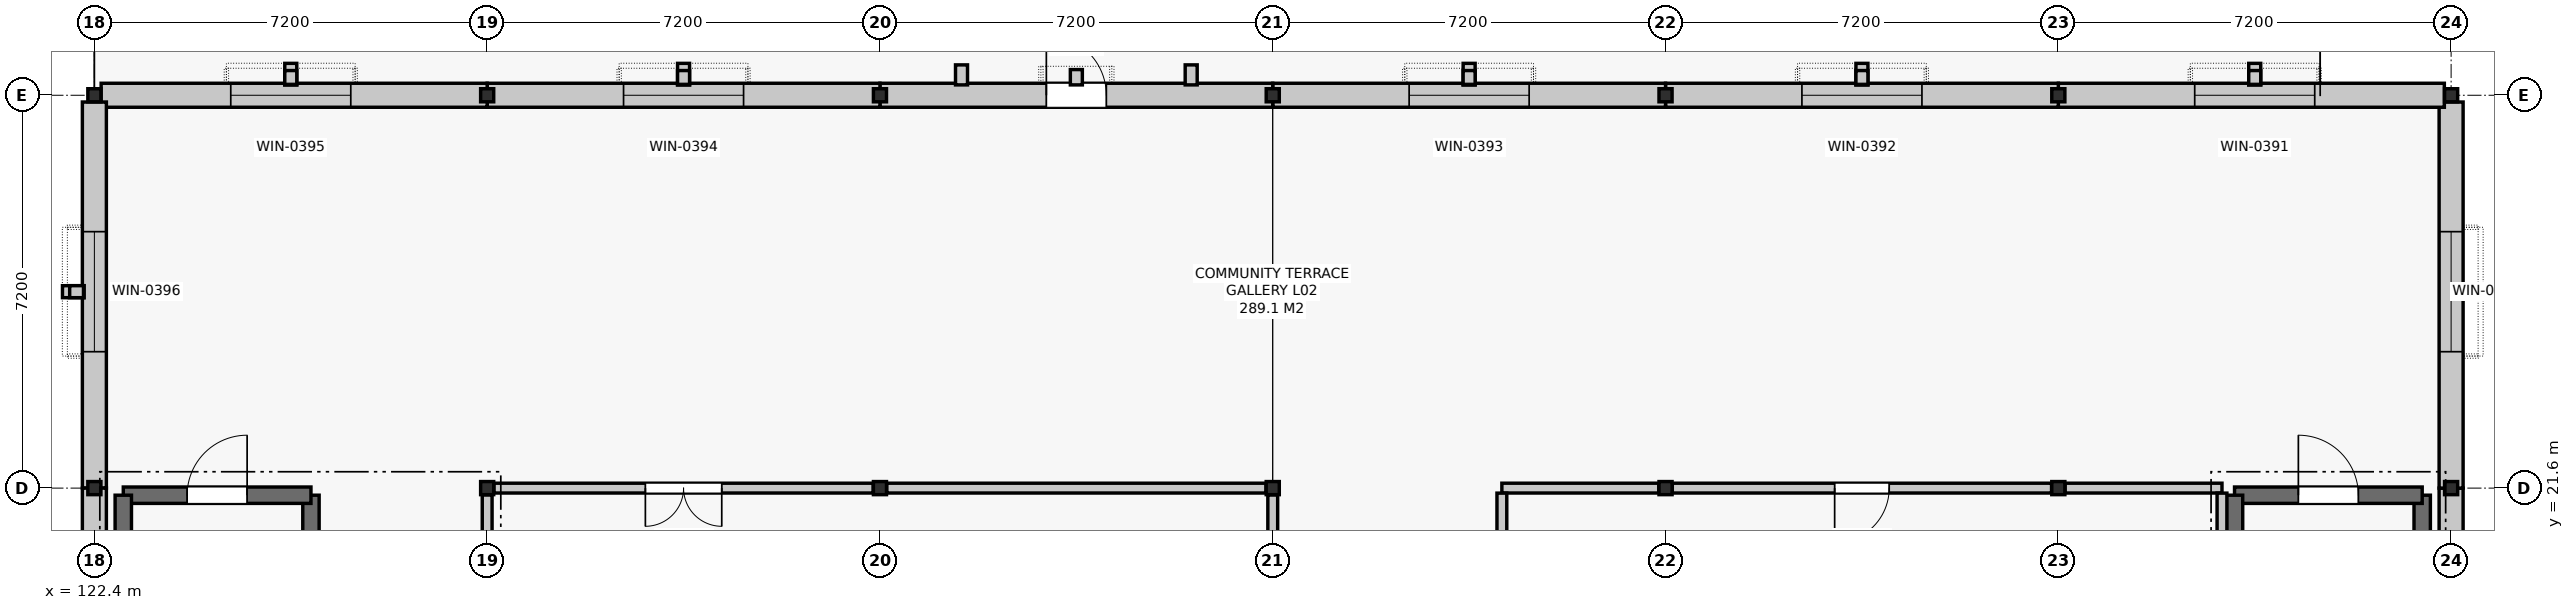
"""IFC4 building model, lengths in metres.
Left out: names, types, materials, properties, quantities, classifications, styles, units other than length and angle.
Written with IfcOpenShell. Run it as: python <this file> out.ifc"""

import sys

from ifc_helpers import new_model, si_unit, direction, frame, frame_2d, origin, origin_2d, place, context, subcontext, project, spatial, rectangle, i_section, extrude, element, fill, save


model = new_model("IFC4")
c1 = context("Model", 3, precision=1e-05, world=origin(), true_north=direction((0.0, 1.0)))
c2 = subcontext(c1, "Body", "Model", "MODEL_VIEW")
j1 = project(units=[si_unit("LENGTHUNIT", "METRE"), si_unit("PLANEANGLEUNIT", "RADIAN")], contexts=[c1])
p1 = place(None, origin())
s1 = spatial("IfcSite", under=j1, at=p1, CompositionType="ELEMENT")
p2 = place(p1, origin())
s2 = spatial("IfcBuilding", under=s1, at=p2, CompositionType="ELEMENT")
p3 = place(p2, frame((0.0, 0.0, 10.2)))
s3 = spatial("IfcBuildingStorey", under=s2, at=p3, CompositionType="ELEMENT", Elevation=10.2)
for number, where, z_axis, x_axis in (
    (1, (122.4, 21.6, 0.0), (0.0, 0.0, 1.0), (1.0, 0.0, 0.0)),
    (2, (122.4, 28.8, 0.0), (0.0, 0.0, 1.0), (1.0, 0.0, 0.0)),
    (3, (129.6, 21.6, 0.0), (0.0, 0.0, 1.0), (1.0, 0.0, 0.0)),
    (4, (129.6, 28.8, 0.0), (0.0, 0.0, 1.0), (1.0, 0.0, 0.0)),
    (5, (136.8, 21.6, 0.0), (0.0, 0.0, 1.0), (1.0, 0.0, 0.0)),
    (6, (136.8, 28.8, 0.0), (0.0, 0.0, 1.0), (1.0, 0.0, 0.0)),
    (7, (144.0, 21.6, 0.0), (0.0, 0.0, 1.0), (1.0, 0.0, 0.0)),
    (8, (144.0, 28.8, 0.0), (0.0, 0.0, 1.0), (1.0, 0.0, 0.0)),
    (9, (151.2, 21.6, 0.0), (0.0, 0.0, 1.0), (1.0, 0.0, 0.0)),
    (10, (151.2, 28.8, 0.0), (0.0, 0.0, 1.0), (1.0, 0.0, 0.0)),
    (11, (158.4, 21.6, 0.0), (0.0, 0.0, 1.0), (1.0, 0.0, 0.0)),
    (12, (158.4, 28.8, 0.0), (0.0, 0.0, 1.0), (1.0, 0.0, 0.0)),
    (13, (165.6, 21.6, 0.0), (0.0, 0.0, 1.0), (1.0, 0.0, 0.0)),
    (14, (165.6, 28.8, 0.0), (0.0, 0.0, 1.0), (1.0, 0.0, 0.0)),
):
    element("IfcColumn", number, at=place(p3, frame(where, z_axis=z_axis, x_axis=x_axis)), inside=s3, PredefinedType="COLUMN", context=c2, shape_type="SweptSolid", body=[
        extrude(i_section(OverallWidth=0.24, OverallDepth=0.24, WebThickness=0.01, FlangeThickness=0.017, FilletRadius=0.021, at=origin_2d()), origin(), (0.0, 0.0, 1.0), 4.2),
    ])
p4 = place(p3, frame((165.6, 14.4, 0.0), z_axis=(0.0, 0.0, 1.0), x_axis=(0.0, 1.0, 0.0)))
e15 = element("IfcWall", 15, at=p4, inside=s3, PredefinedType="SOLIDWALL", context=c2, shape_type="SweptSolid", body=[
    extrude(rectangle(XDim=7.2, YDim=0.44, at=frame_2d((3.6, 0.0))), origin(), (0.0, 0.0, 1.0), 3.2),
])
p5 = place(p3, frame((165.6, 21.6, 0.0), z_axis=(0.0, 0.0, 1.0), x_axis=(0.0, 1.0, 0.0)))
e16 = element("IfcWall", 16, at=p5, inside=s3, PredefinedType="SOLIDWALL", context=c2, shape_type="SweptSolid", body=[
    extrude(rectangle(XDim=7.076, YDim=0.44, at=frame_2d((3.538, 0.0))), origin(), (0.0, 0.0, 1.0), 3.2),
])
p6 = place(p5, frame((2.5, 0.0, 0.87)))
e17 = element("IfcOpeningElement", 17, at=p6, cuts=e16, PredefinedType="OPENING", context=c2, shape_type="SweptSolid", body=[
    extrude(rectangle(XDim=2.2, YDim=2.25, at=frame_2d((1.1, 1.125))), frame((0.0, 0.232, 0.0), z_axis=(0.0, -1.0, 0.0), x_axis=(1.0, 0.0, 0.0)), (0.0, 0.0, 1.0), 0.464),
])
p7 = place(p3, frame((165.476, 28.8, 0.0), z_axis=(0.0, 0.0, 1.0), x_axis=(-1.0, 0.0, 0.0)))
e18 = element("IfcWall", 18, at=p7, inside=s3, PredefinedType="SOLIDWALL", context=c2, shape_type="SweptSolid", body=[
    extrude(rectangle(XDim=7.076, YDim=0.44, at=frame_2d((3.538, 0.0))), origin(), (0.0, 0.0, 1.0), 3.2),
])
p8 = place(p7, frame((2.376, 0.0, 0.87)))
e19 = element("IfcOpeningElement", 19, at=p8, cuts=e18, PredefinedType="OPENING", context=c2, shape_type="SweptSolid", body=[
    extrude(rectangle(XDim=2.2, YDim=2.25, at=frame_2d((1.1, 1.125))), frame((0.0, 0.232, 0.0), z_axis=(0.0, -1.0, 0.0), x_axis=(1.0, 0.0, 0.0)), (0.0, 0.0, 1.0), 0.464),
])
p9 = place(p3, frame((158.4, 28.8, 0.0), z_axis=(0.0, 0.0, 1.0), x_axis=(-1.0, 0.0, 0.0)))
e20 = element("IfcWall", 20, at=p9, inside=s3, PredefinedType="SOLIDWALL", context=c2, shape_type="SweptSolid", body=[
    extrude(rectangle(XDim=7.2, YDim=0.44, at=frame_2d((3.6, 0.0))), origin(), (0.0, 0.0, 1.0), 3.2),
])
p10 = place(p9, frame((2.5, 0.0, 0.87)))
e21 = element("IfcOpeningElement", 21, at=p10, cuts=e20, PredefinedType="OPENING", context=c2, shape_type="SweptSolid", body=[
    extrude(rectangle(XDim=2.2, YDim=2.25, at=frame_2d((1.1, 1.125))), frame((0.0, 0.232, 0.0), z_axis=(0.0, -1.0, 0.0), x_axis=(1.0, 0.0, 0.0)), (0.0, 0.0, 1.0), 0.464),
])
p11 = place(p3, frame((151.2, 28.8, 0.0), z_axis=(0.0, 0.0, 1.0), x_axis=(-1.0, 0.0, 0.0)))
e22 = element("IfcWall", 22, at=p11, inside=s3, PredefinedType="SOLIDWALL", context=c2, shape_type="SweptSolid", body=[
    extrude(rectangle(XDim=7.2, YDim=0.44, at=frame_2d((3.6, 0.0))), origin(), (0.0, 0.0, 1.0), 3.2),
])
p12 = place(p11, frame((2.5, 0.0, 0.87)))
e23 = element("IfcOpeningElement", 23, at=p12, cuts=e22, PredefinedType="OPENING", context=c2, shape_type="SweptSolid", body=[
    extrude(rectangle(XDim=2.2, YDim=2.25, at=frame_2d((1.1, 1.125))), frame((0.0, 0.232, 0.0), z_axis=(0.0, -1.0, 0.0), x_axis=(1.0, 0.0, 0.0)), (0.0, 0.0, 1.0), 0.464),
])
p13 = place(p3, frame((144.0, 28.8, 0.0), z_axis=(0.0, 0.0, 1.0), x_axis=(-1.0, 0.0, 0.0)))
e24 = element("IfcWall", 24, at=p13, inside=s3, PredefinedType="SOLIDWALL", context=c2, shape_type="SweptSolid", body=[
    extrude(rectangle(XDim=7.2, YDim=0.44, at=frame_2d((3.6, 0.0))), origin(), (0.0, 0.0, 1.0), 3.2),
])
p14 = place(p13, frame((3.05, 0.0, 0.0)))
e25 = element("IfcOpeningElement", 25, at=p14, cuts=e24, PredefinedType="OPENING", context=c2, shape_type="SweptSolid", body=[
    extrude(rectangle(XDim=1.1, YDim=2.2, at=frame_2d((0.55, 1.1))), frame((0.0, 0.232, 0.0), z_axis=(0.0, -1.0, 0.0), x_axis=(1.0, 0.0, 0.0)), (0.0, 0.0, 1.0), 0.464),
])
p15 = place(p3, frame((136.8, 28.8, 0.0), z_axis=(0.0, 0.0, 1.0), x_axis=(-1.0, 0.0, 0.0)))
e26 = element("IfcWall", 26, at=p15, inside=s3, PredefinedType="SOLIDWALL", context=c2, shape_type="SweptSolid", body=[
    extrude(rectangle(XDim=7.2, YDim=0.44, at=frame_2d((3.6, 0.0))), origin(), (0.0, 0.0, 1.0), 3.2),
])
p16 = place(p15, frame((2.5, 0.0, 0.87)))
e27 = element("IfcOpeningElement", 27, at=p16, cuts=e26, PredefinedType="OPENING", context=c2, shape_type="SweptSolid", body=[
    extrude(rectangle(XDim=2.2, YDim=2.25, at=frame_2d((1.1, 1.125))), frame((0.0, 0.232, 0.0), z_axis=(0.0, -1.0, 0.0), x_axis=(1.0, 0.0, 0.0)), (0.0, 0.0, 1.0), 0.464),
])
p17 = place(p3, frame((129.6, 28.8, 0.0), z_axis=(0.0, 0.0, 1.0), x_axis=(-1.0, 0.0, 0.0)))
e28 = element("IfcWall", 28, at=p17, inside=s3, PredefinedType="SOLIDWALL", context=c2, shape_type="SweptSolid", body=[
    extrude(rectangle(XDim=7.076, YDim=0.44, at=frame_2d((3.538, 0.0))), origin(), (0.0, 0.0, 1.0), 3.2),
])
p18 = place(p17, frame((2.5, 0.0, 0.87)))
e29 = element("IfcOpeningElement", 29, at=p18, cuts=e28, PredefinedType="OPENING", context=c2, shape_type="SweptSolid", body=[
    extrude(rectangle(XDim=2.2, YDim=2.25, at=frame_2d((1.1, 1.125))), frame((0.0, 0.232, 0.0), z_axis=(0.0, -1.0, 0.0), x_axis=(1.0, 0.0, 0.0)), (0.0, 0.0, 1.0), 0.464),
])
p19 = place(p3, frame((122.4, 28.676, 0.0), z_axis=(0.0, 0.0, 1.0), x_axis=(0.0, -1.0, 0.0)))
e30 = element("IfcWall", 30, at=p19, inside=s3, PredefinedType="SOLIDWALL", context=c2, shape_type="SweptSolid", body=[
    extrude(rectangle(XDim=7.076, YDim=0.44, at=frame_2d((3.538, 0.0))), origin(), (0.0, 0.0, 1.0), 3.2),
])
p20 = place(p19, frame((2.376, 0.0, 0.87)))
e31 = element("IfcOpeningElement", 31, at=p20, cuts=e30, PredefinedType="OPENING", context=c2, shape_type="SweptSolid", body=[
    extrude(rectangle(XDim=2.2, YDim=2.25, at=frame_2d((1.1, 1.125))), frame((0.0, 0.232, 0.0), z_axis=(0.0, -1.0, 0.0), x_axis=(1.0, 0.0, 0.0)), (0.0, 0.0, 1.0), 0.464),
])
p21 = place(p3, frame((122.4, 21.6, 0.0), z_axis=(0.0, 0.0, 1.0), x_axis=(0.0, -1.0, 0.0)))
e32 = element("IfcWall", 32, at=p21, inside=s3, PredefinedType="SOLIDWALL", context=c2, shape_type="SweptSolid", body=[
    extrude(rectangle(XDim=7.2, YDim=0.44, at=frame_2d((3.6, 0.0))), origin(), (0.0, 0.0, 1.0), 3.2),
])
p22 = place(p21, frame((2.5, 0.0, 0.87)))
e33 = element("IfcOpeningElement", 33, at=p22, cuts=e32, PredefinedType="OPENING", context=c2, shape_type="SweptSolid", body=[
    extrude(rectangle(XDim=2.2, YDim=2.25, at=frame_2d((1.1, 1.125))), frame((0.0, 0.232, 0.0), z_axis=(0.0, -1.0, 0.0), x_axis=(1.0, 0.0, 0.0)), (0.0, 0.0, 1.0), 0.464),
])
p23 = place(p3, frame((126.37, 14.43, 0.0), z_axis=(0.0, 0.0, 1.0), x_axis=(0.0, 1.0, 0.0)))
e34 = element("IfcWall", 34, at=p23, inside=s3, PredefinedType="SHEAR", context=c2, shape_type="SweptSolid", body=[
    extrude(rectangle(XDim=7.04, YDim=0.3, at=frame_2d((3.52, 0.0))), origin(), (0.0, 0.0, 1.0), 3.92),
])
p24 = place(p3, frame((126.37, 21.47, 0.0), z_axis=(0.0, 0.0, 1.0), x_axis=(-1.0, 0.0, 0.0)))
e35 = element("IfcWall", 35, at=p24, inside=s3, PredefinedType="SHEAR", context=c2, shape_type="SweptSolid", body=[
    extrude(rectangle(XDim=3.44, YDim=0.3, at=frame_2d((1.72, 0.0))), origin(), (0.0, 0.0, 1.0), 3.92),
])
p25 = place(p24, frame((1.17, 0.0, 0.0)))
e36 = element("IfcOpeningElement", 36, at=p25, cuts=e35, PredefinedType="OPENING", context=c2, shape_type="SweptSolid", body=[
    extrude(rectangle(XDim=1.1, YDim=2.15, at=frame_2d((0.55, 1.075))), frame((0.0, 0.162, 0.0), z_axis=(0.0, -1.0, 0.0), x_axis=(1.0, 0.0, 0.0)), (0.0, 0.0, 1.0), 0.324),
])
for number, where, z_axis, x_axis in (
    (37, (122.93, 21.47, 0.0), (0.0, 0.0, 1.0), (0.0, -1.0, 0.0)),
    (38, (165.07, 14.43, 0.0), (0.0, 0.0, 1.0), (0.0, 1.0, 0.0)),
):
    element("IfcWall", number, at=place(p3, frame(where, z_axis=z_axis, x_axis=x_axis)), inside=s3, PredefinedType="SHEAR", context=c2, shape_type="SweptSolid", body=[
        extrude(rectangle(XDim=7.04, YDim=0.3, at=frame_2d((3.52, 0.0))), origin(), (0.0, 0.0, 1.0), 3.92),
    ])
p26 = place(p3, frame((165.07, 21.47, 0.0), z_axis=(0.0, 0.0, 1.0), x_axis=(-1.0, 0.0, 0.0)))
e39 = element("IfcWall", 39, at=p26, inside=s3, PredefinedType="SHEAR", context=c2, shape_type="SweptSolid", body=[
    extrude(rectangle(XDim=3.44, YDim=0.3, at=frame_2d((1.72, 0.0))), origin(), (0.0, 0.0, 1.0), 3.92),
])
p27 = place(p26, frame((1.17, 0.0, 0.0)))
e40 = element("IfcOpeningElement", 40, at=p27, cuts=e39, PredefinedType="OPENING", context=c2, shape_type="SweptSolid", body=[
    extrude(rectangle(XDim=1.1, YDim=2.15, at=frame_2d((0.55, 1.075))), frame((0.0, 0.162, 0.0), z_axis=(0.0, -1.0, 0.0), x_axis=(1.0, 0.0, 0.0)), (0.0, 0.0, 1.0), 0.324),
])
p28 = place(p3, frame((161.63, 21.47, 0.0), z_axis=(0.0, 0.0, 1.0), x_axis=(0.0, -1.0, 0.0)))
e41 = element("IfcWall", 41, at=p28, inside=s3, PredefinedType="SHEAR", context=c2, shape_type="SweptSolid", body=[
    extrude(rectangle(XDim=7.04, YDim=0.3, at=frame_2d((3.52, 0.0))), origin(), (0.0, 0.0, 1.0), 3.92),
])
p29 = place(p3, frame((148.2, 21.6, 0.0), z_axis=(0.0, 0.0, 1.0), x_axis=(1.0, 0.0, 0.0)))
e42 = element("IfcWall", 42, at=p29, inside=s3, PredefinedType="PARTITIONING", context=c2, shape_type="SweptSolid", body=[
    extrude(rectangle(XDim=2.876, YDim=0.18, at=frame_2d((1.438, 0.0))), origin(), (0.0, 0.0, 1.0), 3.515),
])
p30 = place(p3, frame((151.324, 21.6, 0.0), z_axis=(0.0, 0.0, 1.0), x_axis=(1.0, 0.0, 0.0)))
e43 = element("IfcWall", 43, at=p30, inside=s3, PredefinedType="PARTITIONING", context=c2, shape_type="SweptSolid", body=[
    extrude(rectangle(XDim=6.952, YDim=0.18, at=frame_2d((3.476, 0.0))), origin(), (0.0, 0.0, 1.0), 3.515),
])
p31 = place(p30, frame((2.976, 0.0, 0.0)))
e44 = element("IfcOpeningElement", 44, at=p31, cuts=e43, PredefinedType="OPENING", context=c2, shape_type="SweptSolid", body=[
    extrude(rectangle(XDim=1.0, YDim=2.15, at=frame_2d((0.5, 1.075))), frame((0.0, 0.102, 0.0), z_axis=(0.0, -1.0, 0.0), x_axis=(1.0, 0.0, 0.0)), (0.0, 0.0, 1.0), 0.204),
])
p32 = place(p3, frame((158.524, 21.6, 0.0), z_axis=(0.0, 0.0, 1.0), x_axis=(1.0, 0.0, 0.0)))
e45 = element("IfcWall", 45, at=p32, inside=s3, PredefinedType="PARTITIONING", context=c2, shape_type="SweptSolid", body=[
    extrude(rectangle(XDim=2.876, YDim=0.18, at=frame_2d((1.438, 0.0))), origin(), (0.0, 0.0, 1.0), 3.515),
])
p33 = place(p3, frame((129.724, 21.6, 0.0), z_axis=(0.0, 0.0, 1.0), x_axis=(1.0, 0.0, 0.0)))
e46 = element("IfcWall", 46, at=p33, inside=s3, PredefinedType="PARTITIONING", context=c2, shape_type="SweptSolid", body=[
    extrude(rectangle(XDim=6.952, YDim=0.18, at=frame_2d((3.476, 0.0))), origin(), (0.0, 0.0, 1.0), 3.205),
])
p34 = place(p33, frame((2.776, 0.0, 0.0)))
e47 = element("IfcOpeningElement", 47, at=p34, cuts=e46, PredefinedType="OPENING", context=c2, shape_type="SweptSolid", body=[
    extrude(rectangle(XDim=1.4, YDim=2.2, at=frame_2d((0.7, 1.1))), frame((0.0, 0.102, 0.0), z_axis=(0.0, -1.0, 0.0), x_axis=(1.0, 0.0, 0.0)), (0.0, 0.0, 1.0), 0.204),
])
p35 = place(p3, frame((136.924, 21.6, 0.0), z_axis=(0.0, 0.0, 1.0), x_axis=(1.0, 0.0, 0.0)))
e48 = element("IfcWall", 48, at=p35, inside=s3, PredefinedType="PARTITIONING", context=c2, shape_type="SweptSolid", body=[
    extrude(rectangle(XDim=6.952, YDim=0.18, at=frame_2d((3.476, 0.0))), origin(), (0.0, 0.0, 1.0), 3.205),
])
p36 = place(p3, frame((148.2, 18.077, 0.0), z_axis=(0.0, 0.0, 1.0), x_axis=(0.0, 1.0, 0.0)))
e49 = element("IfcWall", 49, at=p36, inside=s3, PredefinedType="PARTITIONING", context=c2, shape_type="SweptSolid", body=[
    extrude(rectangle(XDim=3.431, YDim=0.18, at=frame_2d((1.716, 0.0))), origin(), (0.0, 0.0, 1.0), 3.515),
])
p37 = place(p3, frame((161.4, 18.092, 0.0), z_axis=(0.0, 0.0, 1.0), x_axis=(0.0, 1.0, 0.0)))
e50 = element("IfcWall", 50, at=p37, inside=s3, PredefinedType="PARTITIONING", context=c2, shape_type="SweptSolid", body=[
    extrude(rectangle(XDim=3.416, YDim=0.18, at=frame_2d((1.708, 0.0))), origin(), (0.0, 0.0, 1.0), 3.515),
])
for number, where, z_axis, x_axis in (
    (51, (129.6, 14.524, 0.0), (0.0, 0.0, 1.0), (0.0, 1.0, 0.0)),
    (52, (144.0, 14.524, 0.0), (0.0, 0.0, 1.0), (0.0, 1.0, 0.0)),
):
    element("IfcWall", number, at=place(p3, frame(where, z_axis=z_axis, x_axis=x_axis)), inside=s3, PredefinedType="PARTITIONING", context=c2, shape_type="SweptSolid", body=[
        extrude(rectangle(XDim=6.952, YDim=0.18, at=frame_2d((3.476, 0.0))), origin(), (0.0, 0.0, 1.0), 3.015),
    ])
p38 = place(p6, origin())
e53 = element("IfcWindow", 53, at=p38, inside=s3, PartitioningType="SINGLE_PANEL", PredefinedType="WINDOW", context=c2, shape_type="SweptSolid", body=[
    extrude(rectangle(XDim=2.2, YDim=2.25, at=frame_2d((1.1, 1.125))), frame((0.0, 0.03, 0.0), z_axis=(0.0, -1.0, 0.0), x_axis=(1.0, 0.0, 0.0)), (0.0, 0.0, 1.0), 0.06),
])
fill(e17, e53)
p39 = place(p8, origin())
e54 = element("IfcWindow", 54, at=p39, inside=s3, PartitioningType="SINGLE_PANEL", PredefinedType="WINDOW", context=c2, shape_type="SweptSolid", body=[
    extrude(rectangle(XDim=2.2, YDim=2.25, at=frame_2d((1.1, 1.125))), frame((0.0, 0.03, 0.0), z_axis=(0.0, -1.0, 0.0), x_axis=(1.0, 0.0, 0.0)), (0.0, 0.0, 1.0), 0.06),
])
fill(e19, e54)
p40 = place(p10, origin())
e55 = element("IfcWindow", 55, at=p40, inside=s3, PartitioningType="SINGLE_PANEL", PredefinedType="WINDOW", context=c2, shape_type="SweptSolid", body=[
    extrude(rectangle(XDim=2.2, YDim=2.25, at=frame_2d((1.1, 1.125))), frame((0.0, 0.03, 0.0), z_axis=(0.0, -1.0, 0.0), x_axis=(1.0, 0.0, 0.0)), (0.0, 0.0, 1.0), 0.06),
])
fill(e21, e55)
p41 = place(p12, origin())
e56 = element("IfcWindow", 56, at=p41, inside=s3, PartitioningType="SINGLE_PANEL", PredefinedType="WINDOW", context=c2, shape_type="SweptSolid", body=[
    extrude(rectangle(XDim=2.2, YDim=2.25, at=frame_2d((1.1, 1.125))), frame((0.0, 0.03, 0.0), z_axis=(0.0, -1.0, 0.0), x_axis=(1.0, 0.0, 0.0)), (0.0, 0.0, 1.0), 0.06),
])
fill(e23, e56)
p42 = place(p14, frame((1.1, 0.0, 0.0), z_axis=(0.0, 0.0, 1.0), x_axis=(-1.0, 0.0, 0.0)))
e57 = element("IfcDoor", 57, at=p42, inside=s3, OperationType="SINGLE_SWING_LEFT", PredefinedType="DOOR", context=c2, shape_type="SweptSolid", body=[
    extrude(rectangle(XDim=1.1, YDim=2.2, at=frame_2d((0.55, 1.1))), frame((0.0, 0.025, 0.0), z_axis=(0.0, -1.0, 0.0), x_axis=(1.0, 0.0, 0.0)), (0.0, 0.0, 1.0), 0.05),
])
fill(e25, e57)
p43 = place(p16, origin())
e58 = element("IfcWindow", 58, at=p43, inside=s3, PartitioningType="SINGLE_PANEL", PredefinedType="WINDOW", context=c2, shape_type="SweptSolid", body=[
    extrude(rectangle(XDim=2.2, YDim=2.25, at=frame_2d((1.1, 1.125))), frame((0.0, 0.03, 0.0), z_axis=(0.0, -1.0, 0.0), x_axis=(1.0, 0.0, 0.0)), (0.0, 0.0, 1.0), 0.06),
])
fill(e27, e58)
p44 = place(p18, origin())
e59 = element("IfcWindow", 59, at=p44, inside=s3, PartitioningType="SINGLE_PANEL", PredefinedType="WINDOW", context=c2, shape_type="SweptSolid", body=[
    extrude(rectangle(XDim=2.2, YDim=2.25, at=frame_2d((1.1, 1.125))), frame((0.0, 0.03, 0.0), z_axis=(0.0, -1.0, 0.0), x_axis=(1.0, 0.0, 0.0)), (0.0, 0.0, 1.0), 0.06),
])
fill(e29, e59)
p45 = place(p20, origin())
e60 = element("IfcWindow", 60, at=p45, inside=s3, PartitioningType="SINGLE_PANEL", PredefinedType="WINDOW", context=c2, shape_type="SweptSolid", body=[
    extrude(rectangle(XDim=2.2, YDim=2.25, at=frame_2d((1.1, 1.125))), frame((0.0, 0.03, 0.0), z_axis=(0.0, -1.0, 0.0), x_axis=(1.0, 0.0, 0.0)), (0.0, 0.0, 1.0), 0.06),
])
fill(e31, e60)
p46 = place(p25, frame((1.1, 0.0, 0.0), z_axis=(0.0, 0.0, 1.0), x_axis=(-1.0, 0.0, 0.0)))
e61 = element("IfcDoor", 61, at=p46, inside=s3, OperationType="SINGLE_SWING_RIGHT", PredefinedType="DOOR", context=c2, shape_type="SweptSolid", body=[
    extrude(rectangle(XDim=1.1, YDim=2.15, at=frame_2d((0.55, 1.075))), frame((0.0, 0.025, 0.0), z_axis=(0.0, -1.0, 0.0), x_axis=(1.0, 0.0, 0.0)), (0.0, 0.0, 1.0), 0.05),
])
fill(e36, e61)
p47 = place(p27, frame((1.1, 0.0, 0.0), z_axis=(0.0, 0.0, 1.0), x_axis=(-1.0, 0.0, 0.0)))
e62 = element("IfcDoor", 62, at=p47, inside=s3, OperationType="SINGLE_SWING_LEFT", PredefinedType="DOOR", context=c2, shape_type="SweptSolid", body=[
    extrude(rectangle(XDim=1.1, YDim=2.15, at=frame_2d((0.55, 1.075))), frame((0.0, 0.025, 0.0), z_axis=(0.0, -1.0, 0.0), x_axis=(1.0, 0.0, 0.0)), (0.0, 0.0, 1.0), 0.05),
])
fill(e40, e62)
p48 = place(p31, frame((1.0, 0.0, 0.0), z_axis=(0.0, 0.0, 1.0), x_axis=(-1.0, 0.0, 0.0)))
e63 = element("IfcDoor", 63, at=p48, inside=s3, OperationType="SINGLE_SWING_RIGHT", PredefinedType="DOOR", context=c2, shape_type="SweptSolid", body=[
    extrude(rectangle(XDim=1.0, YDim=2.15, at=frame_2d((0.5, 1.075))), frame((0.0, 0.025, 0.0), z_axis=(0.0, -1.0, 0.0), x_axis=(1.0, 0.0, 0.0)), (0.0, 0.0, 1.0), 0.05),
])
fill(e44, e63)
p49 = place(p34, frame((1.4, 0.0, 0.0), z_axis=(0.0, 0.0, 1.0), x_axis=(-1.0, 0.0, 0.0)))
e64 = element("IfcDoor", 64, at=p49, inside=s3, OperationType="DOUBLE_DOOR_SINGLE_SWING", PredefinedType="DOOR", context=c2, shape_type="SweptSolid", body=[
    extrude(rectangle(XDim=1.4, YDim=2.2, at=frame_2d((0.7, 1.1))), frame((0.0, 0.025, 0.0), z_axis=(0.0, -1.0, 0.0), x_axis=(1.0, 0.0, 0.0)), (0.0, 0.0, 1.0), 0.05),
])
fill(e47, e64)
save(model, sys.argv[1])
